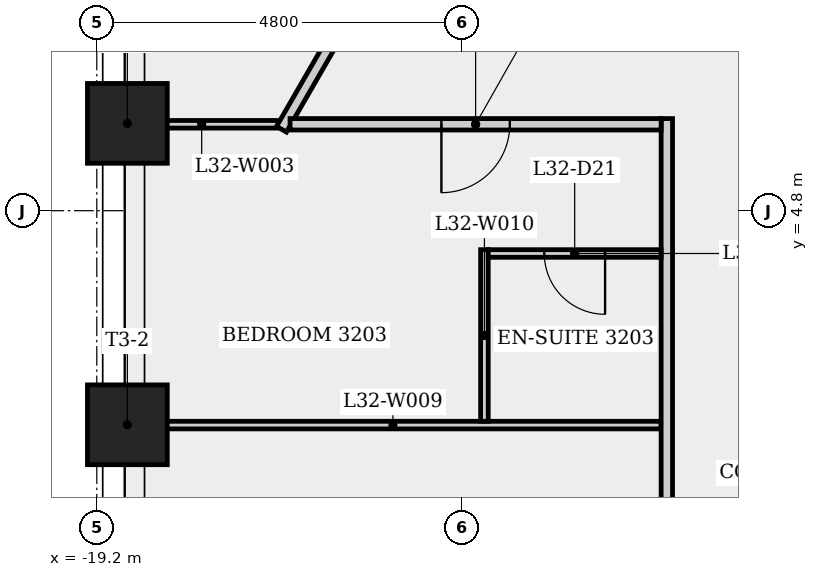
"""IFC4 building model, lengths in metres.
Left out: names, types, materials, properties, quantities, classifications, styles, units other than length and angle.
Written with IfcOpenShell. Run it as: python <this file> out.ifc"""

import sys

from ifc_helpers import new_model, si_unit, direction, frame, frame_2d, origin, origin_2d, place, context, subcontext, project, spatial, rectangle, extrude, element, fill, save


model = new_model("IFC4")
c1 = context("Model", 3, precision=1e-05, world=origin(), true_north=direction((0.0, 1.0)))
c2 = subcontext(c1, "Body", "Model", "MODEL_VIEW")
j1 = project(units=[si_unit("LENGTHUNIT", "METRE"), si_unit("PLANEANGLEUNIT", "RADIAN")], contexts=[c1])
p1 = place(None, origin())
s1 = spatial("IfcSite", under=j1, at=p1, CompositionType="ELEMENT")
p2 = place(p1, origin())
s2 = spatial("IfcBuilding", under=s1, at=p2, CompositionType="ELEMENT")
p3 = place(p2, frame((0.0, 0.0, 120.5)))
s3 = spatial("IfcBuildingStorey", under=s2, at=p3, CompositionType="ELEMENT", Elevation=120.5)
for number, where, z_axis, x_axis in (
    (1, (-18.798, 5.949, 0.0), (0.0, 0.0, 1.0), (-1.0, 0.0, 0.0)),
    (2, (-18.798, 1.983, 0.0), (0.0, 0.0, 1.0), (-1.0, 0.0, 0.0)),
):
    element("IfcColumn", number, at=place(p3, frame(where, z_axis=z_axis, x_axis=x_axis)), inside=s3, PredefinedType="COLUMN", context=c2, shape_type="SweptSolid", body=[
        extrude(rectangle(XDim=1.05, YDim=1.05, at=origin_2d()), origin(), (0.0, 0.0, 1.0), 4.0),
    ])
p4 = place(p3, frame((-16.807, 5.937, 0.0), z_axis=(0.0, 0.0, 1.0), x_axis=(-1.0, 0.0, 0.0)))
e3 = element("IfcWall", 3, at=p4, inside=s3, PredefinedType="PARTITIONING", context=c2, shape_type="SweptSolid", body=[
    extrude(rectangle(XDim=2.026, YDim=0.1, at=frame_2d((1.013, 0.0))), origin(), (0.0, 0.0, 1.0), 3.6),
])
p5 = place(p3, frame((-16.77, 5.872, 0.0), z_axis=(0.0, 0.0, 1.0), x_axis=(0.500023029176, 0.866012107475, 0.0)))
e4 = element("IfcWall", 4, at=p5, inside=s3, PredefinedType="PARTITIONING", context=c2, shape_type="SweptSolid", body=[
    extrude(rectangle(XDim=7.383, YDim=0.15, at=frame_2d((3.691, 0.0))), origin(), (0.0, 0.0, 1.0), 3.6),
])
p6 = place(p5, frame((3.191, 0.0, 0.0)))
e5 = element("IfcOpeningElement", 5, at=p6, cuts=e4, PredefinedType="OPENING", context=c2, shape_type="SweptSolid", body=[
    extrude(rectangle(XDim=1.0, YDim=2.1, at=frame_2d((0.5, 1.05))), frame((0.0, 0.085, 0.0), z_axis=(0.0, -1.0, 0.0), x_axis=(1.0, 0.0, 0.0)), (0.0, 0.0, 1.0), 0.17),
])
p7 = place(p3, frame((-18.833, 1.979, 0.0), z_axis=(0.0, 0.0, 1.0), x_axis=(1.0, 0.0, 0.0)))
e6 = element("IfcWall", 6, at=p7, inside=s3, PredefinedType="PARTITIONING", context=c2, shape_type="SweptSolid", body=[
    extrude(rectangle(XDim=7.058, YDim=0.1, at=frame_2d((3.529, 0.0))), origin(), (0.0, 0.0, 1.0), 3.6),
])
p8 = place(p3, frame((-14.1, 4.287, 0.0), z_axis=(0.0, 0.0, 1.0), x_axis=(0.0, -1.0, 0.0)))
e7 = element("IfcWall", 7, at=p8, inside=s3, PredefinedType="PARTITIONING", context=c2, shape_type="SweptSolid", body=[
    extrude(rectangle(XDim=2.258, YDim=0.1, at=frame_2d((1.129, 0.0))), origin(), (0.0, 0.0, 1.0), 3.6),
])
p9 = place(p3, frame((-11.7, 6.012, 0.0), z_axis=(0.0, 0.0, 1.0), x_axis=(0.0, -1.0, 0.0)))
e8 = element("IfcWall", 8, at=p9, inside=s3, PredefinedType="PARTITIONING", context=c2, shape_type="SweptSolid", body=[
    extrude(rectangle(XDim=11.949, YDim=0.15, at=frame_2d((5.975, 0.0))), origin(), (0.0, 0.0, 1.0), 3.6),
])
p10 = place(p9, frame((5.512, 0.0, 0.0)))
e9 = element("IfcOpeningElement", 9, at=p10, cuts=e8, PredefinedType="OPENING", context=c2, shape_type="SweptSolid", body=[
    extrude(rectangle(XDim=1.0, YDim=2.1, at=frame_2d((0.5, 1.05))), frame((0.0, 0.085, 0.0), z_axis=(0.0, -1.0, 0.0), x_axis=(1.0, 0.0, 0.0)), (0.0, 0.0, 1.0), 0.17),
])
p11 = place(p3, frame((-11.775, 4.237, 0.0), z_axis=(0.0, 0.0, 1.0), x_axis=(-1.0, 0.0, 0.0)))
e10 = element("IfcWall", 10, at=p11, inside=s3, PredefinedType="PARTITIONING", context=c2, shape_type="SweptSolid", body=[
    extrude(rectangle(XDim=2.275, YDim=0.1, at=frame_2d((1.138, 0.0))), origin(), (0.0, 0.0, 1.0), 3.6),
])
p12 = place(p11, frame((0.738, 0.0, 0.0)))
e11 = element("IfcOpeningElement", 11, at=p12, cuts=e10, PredefinedType="OPENING", context=c2, shape_type="SweptSolid", body=[
    extrude(rectangle(XDim=0.8, YDim=2.1, at=frame_2d((0.4, 1.05))), frame((0.0, 0.06, 0.0), z_axis=(0.0, -1.0, 0.0), x_axis=(1.0, 0.0, 0.0)), (0.0, 0.0, 1.0), 0.12),
])
p13 = place(p3, frame((-11.775, 5.937, 0.0), z_axis=(0.0, 0.0, 1.0), x_axis=(-1.0, 0.0, 0.0)))
e12 = element("IfcWall", 12, at=p13, inside=s3, PredefinedType="PARTITIONING", context=c2, shape_type="SweptSolid", body=[
    extrude(rectangle(XDim=4.882, YDim=0.15, at=frame_2d((2.441, 0.0))), origin(), (0.0, 0.0, 1.0), 3.6),
])
p14 = place(p13, frame((1.991, 0.0, 0.0)))
e13 = element("IfcOpeningElement", 13, at=p14, cuts=e12, PredefinedType="OPENING", context=c2, shape_type="SweptSolid", body=[
    extrude(rectangle(XDim=0.9, YDim=2.1, at=frame_2d((0.45, 1.05))), frame((0.0, 0.085, 0.0), z_axis=(0.0, -1.0, 0.0), x_axis=(1.0, 0.0, 0.0)), (0.0, 0.0, 1.0), 0.17),
])
p15 = place(p14, origin())
e14 = element("IfcDoor", 14, at=p15, inside=s3, OperationType="SINGLE_SWING_RIGHT", PredefinedType="DOOR", context=c2, shape_type="SweptSolid", body=[
    extrude(rectangle(XDim=0.9, YDim=2.1, at=frame_2d((0.45, 1.05))), frame((0.0, 0.025, 0.0), z_axis=(0.0, -1.0, 0.0), x_axis=(1.0, 0.0, 0.0)), (0.0, 0.0, 1.0), 0.05),
])
fill(e13, e14)
p16 = place(p12, origin())
e15 = element("IfcDoor", 15, at=p16, inside=s3, OperationType="SINGLE_SWING_LEFT", PredefinedType="DOOR", context=c2, shape_type="SweptSolid", body=[
    extrude(rectangle(XDim=0.8, YDim=2.1, at=frame_2d((0.4, 1.05))), frame((0.0, 0.025, 0.0), z_axis=(0.0, -1.0, 0.0), x_axis=(1.0, 0.0, 0.0)), (0.0, 0.0, 1.0), 0.05),
])
fill(e11, e15)
save(model, sys.argv[1])
